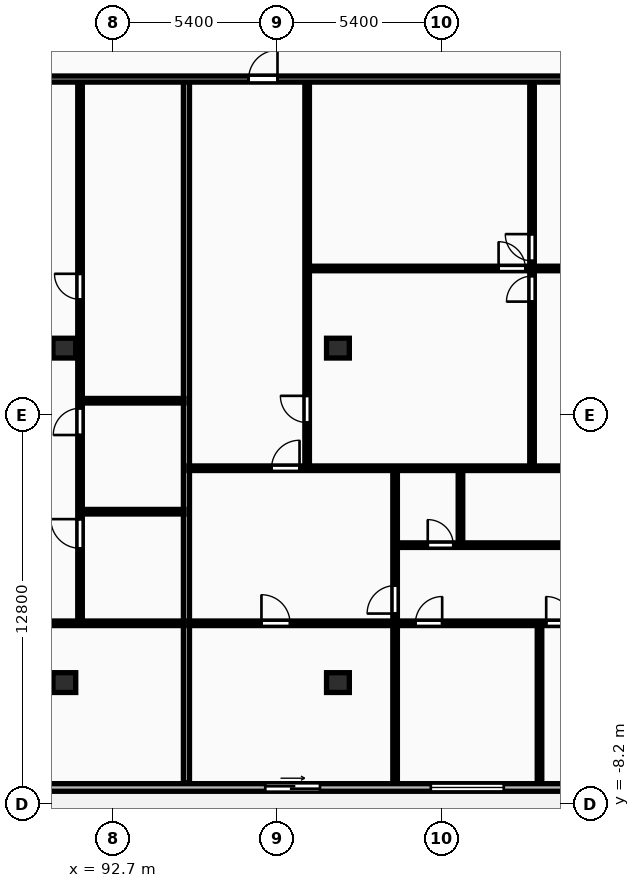
"""IFC4 building model, lengths in metres.
Left out: names, types, materials, properties, quantities, classifications, styles, units other than length and angle.
Written with IfcOpenShell. Run it as: python <this file> out.ifc"""

import sys

from ifc_helpers import new_model, si_unit, direction, frame, frame_2d, origin, origin_2d, place, context, subcontext, project, spatial, rectangle, extrude, element, fill, save


model = new_model("IFC4")
c1 = context("Model", 3, precision=1e-05, world=origin(), true_north=direction((0.0, 1.0)))
c2 = subcontext(c1, "Body", "Model", "MODEL_VIEW")
j1 = project(units=[si_unit("LENGTHUNIT", "METRE"), si_unit("PLANEANGLEUNIT", "RADIAN")], contexts=[c1])
p1 = place(None, origin())
s1 = spatial("IfcSite", under=j1, at=p1, CompositionType="ELEMENT")
p2 = place(p1, origin())
s2 = spatial("IfcBuilding", under=s1, at=p2, CompositionType="ELEMENT")
p3 = place(p2, frame((0.0, 0.0, 201.1)))
s3 = spatial("IfcBuildingStorey", under=s2, at=p3, CompositionType="ELEMENT", Elevation=201.1)
for number, where, z_axis, x_axis in (
    (1, (91.1, -4.2, 0.0), (0.0, 0.0, 1.0), (1.0, 0.0, 0.0)),
    (2, (91.1, 6.8, 0.0), (0.0, 0.0, 1.0), (1.0, 0.0, 0.0)),
    (3, (100.1, -4.2, 0.0), (0.0, 0.0, 1.0), (1.0, 0.0, 0.0)),
    (4, (100.1, 6.8, 0.0), (0.0, 0.0, 1.0), (1.0, 0.0, 0.0)),
):
    element("IfcColumn", number, at=place(p3, frame(where, z_axis=z_axis, x_axis=x_axis)), inside=s3, PredefinedType="COLUMN", context=c2, shape_type="SweptSolid", body=[
        extrude(rectangle(XDim=0.75, YDim=0.65, at=origin_2d()), origin(), (0.0, 0.0, 1.0), 3.25),
    ])
p4 = place(p3, frame((74.5, -7.65, 0.0), z_axis=(0.0, 0.0, 1.0), x_axis=(1.0, 0.0, 0.0)))
e5 = element("IfcWall", 5, at=p4, inside=s3, PredefinedType="STANDARD", context=c2, shape_type="SweptSolid", body=[
    extrude(rectangle(XDim=54.4, YDim=0.25, at=frame_2d((27.2, 0.0))), origin(), (0.0, 0.0, 1.0), 2.97),
])
p5 = place(p4, frame((3.604, 0.0, 0.0)))
e6 = element("IfcOpeningElement", 6, at=p5, cuts=e5, PredefinedType="OPENING", context=c2, shape_type="SweptSolid", body=[
    extrude(rectangle(XDim=1.8, YDim=2.2, at=frame_2d((0.9, 1.1))), frame((0.0, 0.135, 0.0), z_axis=(0.0, -1.0, 0.0), x_axis=(1.0, 0.0, 0.0)), (0.0, 0.0, 1.0), 0.27),
])
p6 = place(p4, frame((13.492, 0.0, 0.85)))
e7 = element("IfcOpeningElement", 7, at=p6, cuts=e5, PredefinedType="OPENING", context=c2, shape_type="SweptSolid", body=[
    extrude(rectangle(XDim=2.4, YDim=1.9, at=frame_2d((1.2, 0.95))), frame((0.0, 0.135, 0.0), z_axis=(0.0, -1.0, 0.0), x_axis=(1.0, 0.0, 0.0)), (0.0, 0.0, 1.0), 0.27),
])
p7 = place(p4, frame((28.655, 0.0, 0.85)))
e8 = element("IfcOpeningElement", 8, at=p7, cuts=e5, PredefinedType="OPENING", context=c2, shape_type="SweptSolid", body=[
    extrude(rectangle(XDim=2.4, YDim=1.9, at=frame_2d((1.2, 0.95))), frame((0.0, 0.135, 0.0), z_axis=(0.0, -1.0, 0.0), x_axis=(1.0, 0.0, 0.0)), (0.0, 0.0, 1.0), 0.27),
])
p8 = place(p4, frame((33.155, 0.0, 0.85)))
e9 = element("IfcOpeningElement", 9, at=p8, cuts=e5, PredefinedType="OPENING", context=c2, shape_type="SweptSolid", body=[
    extrude(rectangle(XDim=2.4, YDim=1.9, at=frame_2d((1.2, 0.95))), frame((0.0, 0.135, 0.0), z_axis=(0.0, -1.0, 0.0), x_axis=(1.0, 0.0, 0.0)), (0.0, 0.0, 1.0), 0.27),
])
p9 = place(p4, frame((23.208, 0.0, 0.0)))
e10 = element("IfcOpeningElement", 10, at=p9, cuts=e5, PredefinedType="OPENING", context=c2, shape_type="SweptSolid", body=[
    extrude(rectangle(XDim=1.8, YDim=2.2, at=frame_2d((0.9, 1.1))), frame((0.0, 0.135, 0.0), z_axis=(0.0, -1.0, 0.0), x_axis=(1.0, 0.0, 0.0)), (0.0, 0.0, 1.0), 0.27),
])
p10 = place(p4, frame((37.101, 0.0, 0.85)))
e11 = element("IfcOpeningElement", 11, at=p10, cuts=e5, PredefinedType="OPENING", context=c2, shape_type="SweptSolid", body=[
    extrude(rectangle(XDim=1.8, YDim=1.8, at=frame_2d((0.9, 0.9))), frame((0.0, 0.135, 0.0), z_axis=(0.0, -1.0, 0.0), x_axis=(1.0, 0.0, 0.0)), (0.0, 0.0, 1.0), 0.27),
])
p11 = place(p4, frame((44.471, 0.0, 0.0)))
e12 = element("IfcOpeningElement", 12, at=p11, cuts=e5, PredefinedType="OPENING", context=c2, shape_type="SweptSolid", body=[
    extrude(rectangle(XDim=1.8, YDim=2.2, at=frame_2d((0.9, 1.1))), frame((0.0, 0.135, 0.0), z_axis=(0.0, -1.0, 0.0), x_axis=(1.0, 0.0, 0.0)), (0.0, 0.0, 1.0), 0.27),
])
p12 = place(p4, frame((51.73, 0.0, 0.85)))
e13 = element("IfcOpeningElement", 13, at=p12, cuts=e5, PredefinedType="OPENING", context=c2, shape_type="SweptSolid", body=[
    extrude(rectangle(XDim=1.8, YDim=1.8, at=frame_2d((0.9, 0.9))), frame((0.0, 0.135, 0.0), z_axis=(0.0, -1.0, 0.0), x_axis=(1.0, 0.0, 0.0)), (0.0, 0.0, 1.0), 0.27),
])
p13 = place(p3, frame((95.117, -7.5, 0.0), z_axis=(0.0, 0.0, 1.0), x_axis=(0.0, 1.0, 0.0)))
e14 = element("IfcWall", 14, at=p13, inside=s3, PredefinedType="PARTITIONING", context=c2, shape_type="SweptSolid", body=[
    extrude(rectangle(XDim=23.07, YDim=0.2, at=frame_2d((11.535, 0.0))), origin(), (0.0, 0.0, 1.0), 2.97),
])
for number, where, z_axis, x_axis in (
    (15, (91.677, 1.42, 0.0), (0.0, 0.0, 1.0), (1.0, 0.0, 0.0)),
    (16, (91.677, 5.07, 0.0), (0.0, 0.0, 1.0), (1.0, 0.0, 0.0)),
):
    element("IfcWall", number, at=place(p3, frame(where, z_axis=z_axis, x_axis=x_axis)), inside=s3, PredefinedType="PARTITIONING", context=c2, shape_type="SweptSolid", body=[
        extrude(rectangle(XDim=3.36, YDim=0.15, at=frame_2d((1.68, 0.0))), origin(), (0.0, 0.0, 1.0), 2.97),
    ])
p14 = place(p3, frame((91.617, -2.19, 0.0), z_axis=(0.0, 0.0, 1.0), x_axis=(0.0, 1.0, 0.0)))
e17 = element("IfcWall", 17, at=p14, inside=s3, PredefinedType="PARTITIONING", context=c2, shape_type="SweptSolid", body=[
    extrude(rectangle(XDim=17.78, YDim=0.15, at=frame_2d((8.89, 0.0))), origin(), (0.0, 0.0, 1.0), 2.97),
])
p15 = place(p14, frame((2.406, 0.0, 0.0)))
e18 = element("IfcOpeningElement", 18, at=p15, cuts=e17, PredefinedType="OPENING", context=c2, shape_type="SweptSolid", body=[
    extrude(rectangle(XDim=0.96, YDim=2.1, at=frame_2d((0.48, 1.05))), frame((0.0, 0.085, 0.0), z_axis=(0.0, -1.0, 0.0), x_axis=(1.0, 0.0, 0.0)), (0.0, 0.0, 1.0), 0.17),
])
p16 = place(p14, frame((6.133, 0.0, 0.0)))
e19 = element("IfcOpeningElement", 19, at=p16, cuts=e17, PredefinedType="OPENING", context=c2, shape_type="SweptSolid", body=[
    extrude(rectangle(XDim=0.88, YDim=2.06, at=frame_2d((0.44, 1.03))), frame((0.0, 0.085, 0.0), z_axis=(0.0, -1.0, 0.0), x_axis=(1.0, 0.0, 0.0)), (0.0, 0.0, 1.0), 0.17),
])
p17 = place(p14, frame((10.595, 0.0, 0.0)))
e20 = element("IfcOpeningElement", 20, at=p17, cuts=e17, PredefinedType="OPENING", context=c2, shape_type="SweptSolid", body=[
    extrude(rectangle(XDim=0.84, YDim=2.04, at=frame_2d((0.42, 1.02))), frame((0.0, 0.085, 0.0), z_axis=(0.0, -1.0, 0.0), x_axis=(1.0, 0.0, 0.0)), (0.0, 0.0, 1.0), 0.17),
])
p18 = place(p3, frame((74.58, -2.25, 0.0), z_axis=(0.0, 0.0, 1.0), x_axis=(1.0, 0.0, 0.0)))
e21 = element("IfcWall", 21, at=p18, inside=s3, PredefinedType="PARTITIONING", context=c2, shape_type="SweptSolid", body=[
    extrude(rectangle(XDim=20.457, YDim=0.15, at=frame_2d((10.228, 0.0))), origin(), (0.0, 0.0, 1.0), 2.97),
])
p19 = place(p18, frame((4.966, 0.0, 0.0)))
e22 = element("IfcOpeningElement", 22, at=p19, cuts=e21, PredefinedType="OPENING", context=c2, shape_type="SweptSolid", body=[
    extrude(rectangle(XDim=0.94, YDim=2.1, at=frame_2d((0.47, 1.05))), frame((0.0, 0.085, 0.0), z_axis=(0.0, -1.0, 0.0), x_axis=(1.0, 0.0, 0.0)), (0.0, 0.0, 1.0), 0.17),
])
p20 = place(p18, frame((9.758, 0.0, 0.0)))
e23 = element("IfcOpeningElement", 23, at=p20, cuts=e21, PredefinedType="OPENING", context=c2, shape_type="SweptSolid", body=[
    extrude(rectangle(XDim=0.94, YDim=2.1, at=frame_2d((0.47, 1.05))), frame((0.0, 0.085, 0.0), z_axis=(0.0, -1.0, 0.0), x_axis=(1.0, 0.0, 0.0)), (0.0, 0.0, 1.0), 0.17),
])
p21 = place(p3, frame((106.484, 2.89, 0.0), z_axis=(0.0, 0.0, 1.0), x_axis=(0.0, 1.0, 0.0)))
e24 = element("IfcWall", 24, at=p21, inside=s3, PredefinedType="PARTITIONING", context=c2, shape_type="SweptSolid", body=[
    extrude(rectangle(XDim=12.7, YDim=0.15, at=frame_2d((6.35, 0.0))), origin(), (0.0, 0.0, 1.0), 2.97),
])
p22 = place(p21, frame((5.44, 0.0, 0.0)))
e25 = element("IfcOpeningElement", 25, at=p22, cuts=e24, PredefinedType="OPENING", context=c2, shape_type="SweptSolid", body=[
    extrude(rectangle(XDim=0.84, YDim=2.04, at=frame_2d((0.42, 1.02))), frame((0.0, 0.085, 0.0), z_axis=(0.0, -1.0, 0.0), x_axis=(1.0, 0.0, 0.0)), (0.0, 0.0, 1.0), 0.17),
])
p23 = place(p21, frame((6.78, 0.0, 0.0)))
e26 = element("IfcOpeningElement", 26, at=p23, cuts=e24, PredefinedType="OPENING", context=c2, shape_type="SweptSolid", body=[
    extrude(rectangle(XDim=0.88, YDim=2.06, at=frame_2d((0.44, 1.03))), frame((0.0, 0.085, 0.0), z_axis=(0.0, -1.0, 0.0), x_axis=(1.0, 0.0, 0.0)), (0.0, 0.0, 1.0), 0.17),
])
p24 = place(p3, frame((99.147, 9.42, 0.0), z_axis=(0.0, 0.0, 1.0), x_axis=(1.0, 0.0, 0.0)))
e27 = element("IfcWall", 27, at=p24, inside=s3, PredefinedType="PARTITIONING", context=c2, shape_type="SweptSolid", body=[
    extrude(rectangle(XDim=14.915, YDim=0.15, at=frame_2d((7.458, 0.0))), origin(), (0.0, 0.0, 1.0), 2.97),
])
p25 = place(p24, frame((6.238, 0.0, 0.0)))
e28 = element("IfcOpeningElement", 28, at=p25, cuts=e27, PredefinedType="OPENING", context=c2, shape_type="SweptSolid", body=[
    extrude(rectangle(XDim=0.88, YDim=2.06, at=frame_2d((0.44, 1.03))), frame((0.0, 0.085, 0.0), z_axis=(0.0, -1.0, 0.0), x_axis=(1.0, 0.0, 0.0)), (0.0, 0.0, 1.0), 0.17),
])
p26 = place(p3, frame((99.087, 2.89, 0.0), z_axis=(0.0, 0.0, 1.0), x_axis=(0.0, 1.0, 0.0)))
e29 = element("IfcWall", 29, at=p26, inside=s3, PredefinedType="PARTITIONING", context=c2, shape_type="SweptSolid", body=[
    extrude(rectangle(XDim=12.7, YDim=0.15, at=frame_2d((6.35, 0.0))), origin(), (0.0, 0.0, 1.0), 2.97),
])
p27 = place(p26, frame((1.461, 0.0, 0.0)))
e30 = element("IfcOpeningElement", 30, at=p27, cuts=e29, PredefinedType="OPENING", context=c2, shape_type="SweptSolid", body=[
    extrude(rectangle(XDim=0.88, YDim=2.06, at=frame_2d((0.44, 1.03))), frame((0.0, 0.085, 0.0), z_axis=(0.0, -1.0, 0.0), x_axis=(1.0, 0.0, 0.0)), (0.0, 0.0, 1.0), 0.17),
])
p28 = place(p3, frame((104.13, 0.34, 0.0), z_axis=(0.0, 0.0, 1.0), x_axis=(0.0, 1.0, 0.0)))
e31 = element("IfcWall", 31, at=p28, inside=s3, PredefinedType="PARTITIONING", context=c2, shape_type="SweptSolid", body=[
    extrude(rectangle(XDim=2.47, YDim=0.15, at=frame_2d((1.235, 0.0))), origin(), (0.0, 0.0, 1.0), 2.97),
])
p29 = place(p3, frame((106.73, -7.5, 0.0), z_axis=(0.0, 0.0, 1.0), x_axis=(0.0, 1.0, 0.0)))
e32 = element("IfcWall", 32, at=p29, inside=s3, PredefinedType="PARTITIONING", context=c2, shape_type="SweptSolid", body=[
    extrude(rectangle(XDim=5.17, YDim=0.15, at=frame_2d((2.585, 0.0))), origin(), (0.0, 0.0, 1.0), 2.97),
])
p30 = place(p3, frame((101.98, -7.5, 0.0), z_axis=(0.0, 0.0, 1.0), x_axis=(0.0, 1.0, 0.0)))
e33 = element("IfcWall", 33, at=p30, inside=s3, PredefinedType="PARTITIONING", context=c2, shape_type="SweptSolid", body=[
    extrude(rectangle(XDim=10.31, YDim=0.15, at=frame_2d((5.155, 0.0))), origin(), (0.0, 0.0, 1.0), 2.97),
])
p31 = place(p30, frame((5.57, 0.0, 0.0)))
e34 = element("IfcOpeningElement", 34, at=p31, cuts=e33, PredefinedType="OPENING", context=c2, shape_type="SweptSolid", body=[
    extrude(rectangle(XDim=0.92, YDim=2.08, at=frame_2d((0.46, 1.04))), frame((0.0, 0.085, 0.0), z_axis=(0.0, -1.0, 0.0), x_axis=(1.0, 0.0, 0.0)), (0.0, 0.0, 1.0), 0.17),
])
p32 = place(p3, frame((102.02, 0.32, 0.0), z_axis=(0.0, 0.0, 1.0), x_axis=(1.0, 0.0, 0.0)))
e35 = element("IfcWall", 35, at=p32, inside=s3, PredefinedType="PARTITIONING", context=c2, shape_type="SweptSolid", body=[
    extrude(rectangle(XDim=12.042, YDim=0.15, at=frame_2d((6.021, 0.0))), origin(), (0.0, 0.0, 1.0), 2.97),
])
p33 = place(p32, frame((1.034, 0.0, 0.0)))
e36 = element("IfcOpeningElement", 36, at=p33, cuts=e35, PredefinedType="OPENING", context=c2, shape_type="SweptSolid", body=[
    extrude(rectangle(XDim=0.84, YDim=2.04, at=frame_2d((0.42, 1.02))), frame((0.0, 0.085, 0.0), z_axis=(0.0, -1.0, 0.0), x_axis=(1.0, 0.0, 0.0)), (0.0, 0.0, 1.0), 0.17),
])
p34 = place(p32, frame((5.601, 0.0, 0.0)))
e37 = element("IfcOpeningElement", 37, at=p34, cuts=e35, PredefinedType="OPENING", context=c2, shape_type="SweptSolid", body=[
    extrude(rectangle(XDim=0.84, YDim=2.04, at=frame_2d((0.42, 1.02))), frame((0.0, 0.085, 0.0), z_axis=(0.0, -1.0, 0.0), x_axis=(1.0, 0.0, 0.0)), (0.0, 0.0, 1.0), 0.17),
])
p35 = place(p32, frame((9.21, 0.0, 0.0)))
e38 = element("IfcOpeningElement", 38, at=p35, cuts=e35, PredefinedType="OPENING", context=c2, shape_type="SweptSolid", body=[
    extrude(rectangle(XDim=0.84, YDim=2.04, at=frame_2d((0.42, 1.02))), frame((0.0, 0.085, 0.0), z_axis=(0.0, -1.0, 0.0), x_axis=(1.0, 0.0, 0.0)), (0.0, 0.0, 1.0), 0.17),
])
p36 = place(p3, frame((95.197, 2.85, 0.0), z_axis=(0.0, 0.0, 1.0), x_axis=(1.0, 0.0, 0.0)))
e39 = element("IfcWall", 39, at=p36, inside=s3, PredefinedType="PARTITIONING", context=c2, shape_type="SweptSolid", body=[
    extrude(rectangle(XDim=18.865, YDim=0.15, at=frame_2d((9.433, 0.0))), origin(), (0.0, 0.0, 1.0), 2.97),
])
p37 = place(p36, frame((2.72, 0.0, 0.0)))
e40 = element("IfcOpeningElement", 40, at=p37, cuts=e39, PredefinedType="OPENING", context=c2, shape_type="SweptSolid", body=[
    extrude(rectangle(XDim=0.92, YDim=2.08, at=frame_2d((0.46, 1.04))), frame((0.0, 0.085, 0.0), z_axis=(0.0, -1.0, 0.0), x_axis=(1.0, 0.0, 0.0)), (0.0, 0.0, 1.0), 0.17),
])
p38 = place(p3, frame((95.197, -2.25, 0.0), z_axis=(0.0, 0.0, 1.0), x_axis=(1.0, 0.0, 0.0)))
e41 = element("IfcWall", 41, at=p38, inside=s3, PredefinedType="PARTITIONING", context=c2, shape_type="SweptSolid", body=[
    extrude(rectangle(XDim=15.783, YDim=0.15, at=frame_2d((7.892, 0.0))), origin(), (0.0, 0.0, 1.0), 2.97),
])
p39 = place(p38, frame((2.387, 0.0, 0.0)))
e42 = element("IfcOpeningElement", 42, at=p39, cuts=e41, PredefinedType="OPENING", context=c2, shape_type="SweptSolid", body=[
    extrude(rectangle(XDim=0.94, YDim=2.1, at=frame_2d((0.47, 1.05))), frame((0.0, 0.085, 0.0), z_axis=(0.0, -1.0, 0.0), x_axis=(1.0, 0.0, 0.0)), (0.0, 0.0, 1.0), 0.17),
])
p40 = place(p38, frame((7.452, 0.0, 0.0)))
e43 = element("IfcOpeningElement", 43, at=p40, cuts=e41, PredefinedType="OPENING", context=c2, shape_type="SweptSolid", body=[
    extrude(rectangle(XDim=0.88, YDim=2.06, at=frame_2d((0.44, 1.03))), frame((0.0, 0.085, 0.0), z_axis=(0.0, -1.0, 0.0), x_axis=(1.0, 0.0, 0.0)), (0.0, 0.0, 1.0), 0.17),
])
p41 = place(p38, frame((11.753, 0.0, 0.0)))
e44 = element("IfcOpeningElement", 44, at=p41, cuts=e41, PredefinedType="OPENING", context=c2, shape_type="SweptSolid", body=[
    extrude(rectangle(XDim=0.88, YDim=2.06, at=frame_2d((0.44, 1.03))), frame((0.0, 0.085, 0.0), z_axis=(0.0, -1.0, 0.0), x_axis=(1.0, 0.0, 0.0)), (0.0, 0.0, 1.0), 0.17),
])
p42 = place(p3, frame((74.5, 15.65, 0.0), z_axis=(0.0, 0.0, 1.0), x_axis=(1.0, 0.0, 0.0)))
e45 = element("IfcWall", 45, at=p42, inside=s3, PredefinedType="PARTITIONING", context=c2, shape_type="SweptSolid", body=[
    extrude(rectangle(XDim=54.4, YDim=0.2, at=frame_2d((27.2, 0.0))), origin(), (0.0, 0.0, 1.0), 2.97),
])
p43 = place(p42, frame((8.618, 0.0, 0.0)))
e46 = element("IfcOpeningElement", 46, at=p43, cuts=e45, PredefinedType="OPENING", context=c2, shape_type="SweptSolid", body=[
    extrude(rectangle(XDim=1.22, YDim=2.18, at=frame_2d((0.61, 1.09))), frame((0.0, 0.11, 0.0), z_axis=(0.0, -1.0, 0.0), x_axis=(1.0, 0.0, 0.0)), (0.0, 0.0, 1.0), 0.22),
])
p44 = place(p42, frame((22.662, 0.0, 0.0)))
e47 = element("IfcOpeningElement", 47, at=p44, cuts=e45, PredefinedType="OPENING", context=c2, shape_type="SweptSolid", body=[
    extrude(rectangle(XDim=0.95, YDim=2.15, at=frame_2d((0.475, 1.075))), frame((0.0, 0.11, 0.0), z_axis=(0.0, -1.0, 0.0), x_axis=(1.0, 0.0, 0.0)), (0.0, 0.0, 1.0), 0.22),
])
p45 = place(p42, frame((41.687, 0.0, 0.0)))
e48 = element("IfcOpeningElement", 48, at=p45, cuts=e45, PredefinedType="OPENING", context=c2, shape_type="SweptSolid", body=[
    extrude(rectangle(XDim=0.95, YDim=2.15, at=frame_2d((0.475, 1.075))), frame((0.0, 0.11, 0.0), z_axis=(0.0, -1.0, 0.0), x_axis=(1.0, 0.0, 0.0)), (0.0, 0.0, 1.0), 0.22),
])
p46 = place(p7, origin())
e49 = element("IfcWindow", 49, at=p46, inside=s3, PartitioningType="DOUBLE_PANEL_VERTICAL", PredefinedType="WINDOW", context=c2, shape_type="SweptSolid", body=[
    extrude(rectangle(XDim=2.4, YDim=1.9, at=frame_2d((1.2, 0.95))), frame((0.0, 0.03, 0.0), z_axis=(0.0, -1.0, 0.0), x_axis=(1.0, 0.0, 0.0)), (0.0, 0.0, 1.0), 0.06),
])
fill(e8, e49)
p47 = place(p9, origin())
e50 = element("IfcDoor", 50, at=p47, inside=s3, OperationType="SLIDING_TO_RIGHT", PredefinedType="DOOR", context=c2, shape_type="SweptSolid", body=[
    extrude(rectangle(XDim=1.8, YDim=2.2, at=frame_2d((0.9, 1.1))), frame((0.0, 0.025, 0.0), z_axis=(0.0, -1.0, 0.0), x_axis=(1.0, 0.0, 0.0)), (0.0, 0.0, 1.0), 0.05),
])
fill(e10, e50)
p48 = place(p15, origin())
e51 = element("IfcDoor", 51, at=p48, inside=s3, OperationType="SINGLE_SWING_RIGHT", PredefinedType="DOOR", context=c2, shape_type="SweptSolid", body=[
    extrude(rectangle(XDim=0.96, YDim=2.1, at=frame_2d((0.48, 1.05))), frame((0.0, 0.025, 0.0), z_axis=(0.0, -1.0, 0.0), x_axis=(1.0, 0.0, 0.0)), (0.0, 0.0, 1.0), 0.05),
])
fill(e18, e51)
p49 = place(p16, origin())
e52 = element("IfcDoor", 52, at=p49, inside=s3, OperationType="SINGLE_SWING_LEFT", PredefinedType="DOOR", context=c2, shape_type="SweptSolid", body=[
    extrude(rectangle(XDim=0.88, YDim=2.06, at=frame_2d((0.44, 1.03))), frame((0.0, 0.025, 0.0), z_axis=(0.0, -1.0, 0.0), x_axis=(1.0, 0.0, 0.0)), (0.0, 0.0, 1.0), 0.05),
])
fill(e19, e52)
p50 = place(p17, origin())
e53 = element("IfcDoor", 53, at=p50, inside=s3, OperationType="SINGLE_SWING_RIGHT", PredefinedType="DOOR", context=c2, shape_type="SweptSolid", body=[
    extrude(rectangle(XDim=0.84, YDim=2.04, at=frame_2d((0.42, 1.02))), frame((0.0, 0.025, 0.0), z_axis=(0.0, -1.0, 0.0), x_axis=(1.0, 0.0, 0.0)), (0.0, 0.0, 1.0), 0.05),
])
fill(e20, e53)
p51 = place(p22, origin())
e54 = element("IfcDoor", 54, at=p51, inside=s3, OperationType="SINGLE_SWING_LEFT", PredefinedType="DOOR", context=c2, shape_type="SweptSolid", body=[
    extrude(rectangle(XDim=0.84, YDim=2.04, at=frame_2d((0.42, 1.02))), frame((0.0, 0.025, 0.0), z_axis=(0.0, -1.0, 0.0), x_axis=(1.0, 0.0, 0.0)), (0.0, 0.0, 1.0), 0.05),
])
fill(e25, e54)
p52 = place(p23, origin())
e55 = element("IfcDoor", 55, at=p52, inside=s3, OperationType="SINGLE_SWING_RIGHT", PredefinedType="DOOR", context=c2, shape_type="SweptSolid", body=[
    extrude(rectangle(XDim=0.88, YDim=2.06, at=frame_2d((0.44, 1.03))), frame((0.0, 0.025, 0.0), z_axis=(0.0, -1.0, 0.0), x_axis=(1.0, 0.0, 0.0)), (0.0, 0.0, 1.0), 0.05),
])
fill(e26, e55)
p53 = place(p25, origin())
e56 = element("IfcDoor", 56, at=p53, inside=s3, OperationType="SINGLE_SWING_LEFT", PredefinedType="DOOR", context=c2, shape_type="SweptSolid", body=[
    extrude(rectangle(XDim=0.88, YDim=2.06, at=frame_2d((0.44, 1.03))), frame((0.0, 0.025, 0.0), z_axis=(0.0, -1.0, 0.0), x_axis=(1.0, 0.0, 0.0)), (0.0, 0.0, 1.0), 0.05),
])
fill(e28, e56)
p54 = place(p27, origin())
e57 = element("IfcDoor", 57, at=p54, inside=s3, OperationType="SINGLE_SWING_RIGHT", PredefinedType="DOOR", context=c2, shape_type="SweptSolid", body=[
    extrude(rectangle(XDim=0.88, YDim=2.06, at=frame_2d((0.44, 1.03))), frame((0.0, 0.025, 0.0), z_axis=(0.0, -1.0, 0.0), x_axis=(1.0, 0.0, 0.0)), (0.0, 0.0, 1.0), 0.05),
])
fill(e30, e57)
p55 = place(p31, origin())
e58 = element("IfcDoor", 58, at=p55, inside=s3, OperationType="SINGLE_SWING_LEFT", PredefinedType="DOOR", context=c2, shape_type="SweptSolid", body=[
    extrude(rectangle(XDim=0.92, YDim=2.08, at=frame_2d((0.46, 1.04))), frame((0.0, 0.025, 0.0), z_axis=(0.0, -1.0, 0.0), x_axis=(1.0, 0.0, 0.0)), (0.0, 0.0, 1.0), 0.05),
])
fill(e34, e58)
p56 = place(p33, origin())
e59 = element("IfcDoor", 59, at=p56, inside=s3, OperationType="SINGLE_SWING_LEFT", PredefinedType="DOOR", context=c2, shape_type="SweptSolid", body=[
    extrude(rectangle(XDim=0.84, YDim=2.04, at=frame_2d((0.42, 1.02))), frame((0.0, 0.025, 0.0), z_axis=(0.0, -1.0, 0.0), x_axis=(1.0, 0.0, 0.0)), (0.0, 0.0, 1.0), 0.05),
])
fill(e36, e59)
p57 = place(p37, origin())
e60 = element("IfcDoor", 60, at=p57, inside=s3, OperationType="SINGLE_SWING_RIGHT", PredefinedType="DOOR", context=c2, shape_type="SweptSolid", body=[
    extrude(rectangle(XDim=0.92, YDim=2.08, at=frame_2d((0.46, 1.04))), frame((0.0, 0.025, 0.0), z_axis=(0.0, -1.0, 0.0), x_axis=(1.0, 0.0, 0.0)), (0.0, 0.0, 1.0), 0.05),
])
fill(e40, e60)
p58 = place(p39, origin())
e61 = element("IfcDoor", 61, at=p58, inside=s3, OperationType="SINGLE_SWING_LEFT", PredefinedType="DOOR", context=c2, shape_type="SweptSolid", body=[
    extrude(rectangle(XDim=0.94, YDim=2.1, at=frame_2d((0.47, 1.05))), frame((0.0, 0.025, 0.0), z_axis=(0.0, -1.0, 0.0), x_axis=(1.0, 0.0, 0.0)), (0.0, 0.0, 1.0), 0.05),
])
fill(e42, e61)
p59 = place(p40, origin())
e62 = element("IfcDoor", 62, at=p59, inside=s3, OperationType="SINGLE_SWING_RIGHT", PredefinedType="DOOR", context=c2, shape_type="SweptSolid", body=[
    extrude(rectangle(XDim=0.88, YDim=2.06, at=frame_2d((0.44, 1.03))), frame((0.0, 0.025, 0.0), z_axis=(0.0, -1.0, 0.0), x_axis=(1.0, 0.0, 0.0)), (0.0, 0.0, 1.0), 0.05),
])
fill(e43, e62)
p60 = place(p41, origin())
e63 = element("IfcDoor", 63, at=p60, inside=s3, OperationType="SINGLE_SWING_LEFT", PredefinedType="DOOR", context=c2, shape_type="SweptSolid", body=[
    extrude(rectangle(XDim=0.88, YDim=2.06, at=frame_2d((0.44, 1.03))), frame((0.0, 0.025, 0.0), z_axis=(0.0, -1.0, 0.0), x_axis=(1.0, 0.0, 0.0)), (0.0, 0.0, 1.0), 0.05),
])
fill(e44, e63)
p61 = place(p44, origin())
e64 = element("IfcDoor", 64, at=p61, inside=s3, OperationType="SINGLE_SWING_RIGHT", PredefinedType="DOOR", context=c2, shape_type="SweptSolid", body=[
    extrude(rectangle(XDim=0.95, YDim=2.15, at=frame_2d((0.475, 1.075))), frame((0.0, 0.025, 0.0), z_axis=(0.0, -1.0, 0.0), x_axis=(1.0, 0.0, 0.0)), (0.0, 0.0, 1.0), 0.05),
])
fill(e47, e64)
save(model, sys.argv[1])
